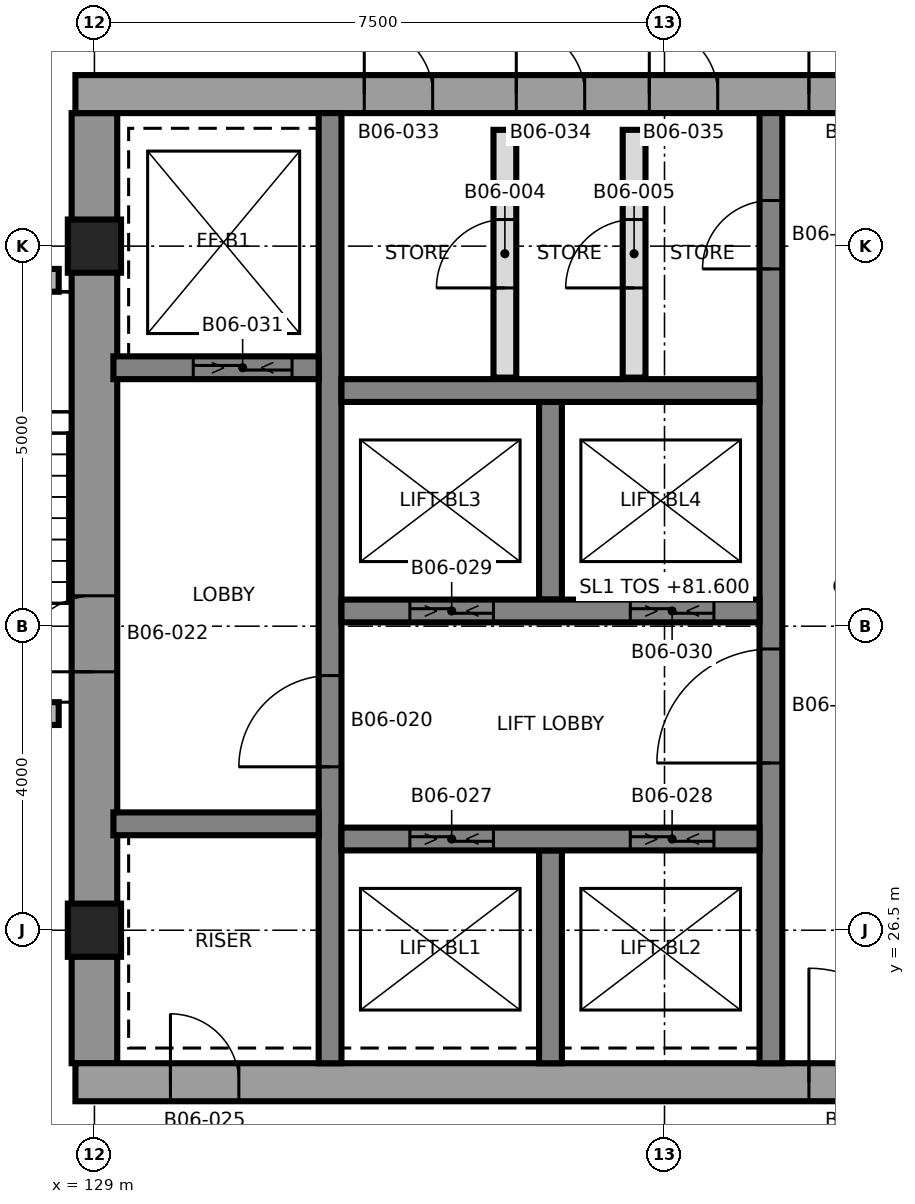
"""IFC4 building model, lengths in metres.
Left out: names, types, materials, properties, quantities, classifications, styles, units other than length and angle.
Written with IfcOpenShell. Run it as: python <this file> out.ifc"""

import sys

from ifc_helpers import new_model, si_unit, direction, frame, frame_2d, origin, origin_2d, place, context, subcontext, project, spatial, rectangle, extrude, element, fill, save


model = new_model("IFC4")
c1 = context("Model", 3, precision=1e-05, world=origin(), true_north=direction((0.0, 1.0)))
c2 = subcontext(c1, "Body", "Model", "MODEL_VIEW")
j1 = project(units=[si_unit("LENGTHUNIT", "METRE"), si_unit("PLANEANGLEUNIT", "RADIAN")], contexts=[c1])
p1 = place(None, origin())
s1 = spatial("IfcSite", under=j1, at=p1, CompositionType="ELEMENT")
p2 = place(p1, origin())
s2 = spatial("IfcBuilding", under=s1, at=p2, CompositionType="ELEMENT")
p3 = place(p2, frame((0.0, 0.0, 81.6)))
s3 = spatial("IfcBuildingStorey", under=s2, at=p3, CompositionType="ELEMENT", Elevation=81.6)
p4 = place(p3, frame((129.0, 24.75, 0.0), z_axis=(0.0, 0.0, 1.0), x_axis=(0.0, 1.0, 0.0)))
e1 = element("IfcWall", 1, at=p4, inside=s3, PredefinedType="SHEAR", context=c2, shape_type="SweptSolid", body=[
    extrude(rectangle(XDim=12.5, YDim=0.6, at=frame_2d((6.25, 0.0))), origin(), (0.0, 0.0, 1.0), 5.5),
])
p5 = place(p4, frame((5.15, 0.0, 0.0)))
e2 = element("IfcOpeningElement", 2, at=p5, cuts=e1, PredefinedType="OPENING", context=c2, shape_type="SweptSolid", body=[
    extrude(rectangle(XDim=1.0, YDim=2.1, at=frame_2d((0.5, 1.05))), frame((0.0, 0.31, 0.0), z_axis=(0.0, -1.0, 0.0), x_axis=(1.0, 0.0, 0.0)), (0.0, 0.0, 1.0), 0.62),
])
p6 = place(p3, frame((128.75, 24.5, 0.0), z_axis=(0.0, 0.0, 1.0), x_axis=(1.0, 0.0, 0.0)))
e3 = element("IfcWall", 3, at=p6, inside=s3, PredefinedType="SHEAR", context=c2, shape_type="SweptSolid", body=[
    extrude(rectangle(XDim=15.0, YDim=0.5, at=frame_2d((7.5, 0.0))), origin(), (0.0, 0.0, 1.0), 5.5),
])
p7 = place(p6, frame((9.65, 0.0, 0.0)))
e4 = element("IfcOpeningElement", 4, at=p7, cuts=e3, PredefinedType="OPENING", context=c2, shape_type="SweptSolid", body=[
    extrude(rectangle(XDim=1.5, YDim=2.1, at=frame_2d((0.75, 1.05))), frame((0.0, 0.26, 0.0), z_axis=(0.0, -1.0, 0.0), x_axis=(1.0, 0.0, 0.0)), (0.0, 0.0, 1.0), 0.52),
])
p8 = place(p6, frame((1.25, 0.0, 0.0)))
e5 = element("IfcOpeningElement", 5, at=p8, cuts=e3, PredefinedType="OPENING", context=c2, shape_type="SweptSolid", body=[
    extrude(rectangle(XDim=0.9, YDim=2.1, at=frame_2d((0.45, 1.05))), frame((0.0, 0.26, 0.0), z_axis=(0.0, -1.0, 0.0), x_axis=(1.0, 0.0, 0.0)), (0.0, 0.0, 1.0), 0.52),
])
p9 = place(p3, frame((128.75, 37.5, 0.0), z_axis=(0.0, 0.0, 1.0), x_axis=(1.0, 0.0, 0.0)))
e6 = element("IfcWall", 6, at=p9, inside=s3, PredefinedType="SHEAR", context=c2, shape_type="SweptSolid", body=[
    extrude(rectangle(XDim=15.0, YDim=0.5, at=frame_2d((7.5, 0.0))), origin(), (0.0, 0.0, 1.0), 5.5),
])
p10 = place(p9, frame((9.65, 0.0, 0.0)))
e7 = element("IfcOpeningElement", 7, at=p10, cuts=e6, PredefinedType="OPENING", context=c2, shape_type="SweptSolid", body=[
    extrude(rectangle(XDim=1.5, YDim=2.1, at=frame_2d((0.75, 1.05))), frame((0.0, 0.26, 0.0), z_axis=(0.0, -1.0, 0.0), x_axis=(1.0, 0.0, 0.0)), (0.0, 0.0, 1.0), 0.52),
])
p11 = place(p9, frame((12.85, 0.0, 0.0)))
e8 = element("IfcOpeningElement", 8, at=p11, cuts=e6, PredefinedType="OPENING", context=c2, shape_type="SweptSolid", body=[
    extrude(rectangle(XDim=0.9, YDim=2.1, at=frame_2d((0.45, 1.05))), frame((0.0, 0.26, 0.0), z_axis=(0.0, -1.0, 0.0), x_axis=(1.0, 0.0, 0.0)), (0.0, 0.0, 1.0), 0.52),
])
p12 = place(p9, frame((3.8, 0.0, 0.0)))
e9 = element("IfcOpeningElement", 9, at=p12, cuts=e6, PredefinedType="OPENING", context=c2, shape_type="SweptSolid", body=[
    extrude(rectangle(XDim=0.9, YDim=2.1, at=frame_2d((0.45, 1.05))), frame((0.0, 0.26, 0.0), z_axis=(0.0, -1.0, 0.0), x_axis=(1.0, 0.0, 0.0)), (0.0, 0.0, 1.0), 0.52),
])
p13 = place(p9, frame((5.8, 0.0, 0.0)))
e10 = element("IfcOpeningElement", 10, at=p13, cuts=e6, PredefinedType="OPENING", context=c2, shape_type="SweptSolid", body=[
    extrude(rectangle(XDim=0.9, YDim=2.1, at=frame_2d((0.45, 1.05))), frame((0.0, 0.26, 0.0), z_axis=(0.0, -1.0, 0.0), x_axis=(1.0, 0.0, 0.0)), (0.0, 0.0, 1.0), 0.52),
])
p14 = place(p9, frame((7.55, 0.0, 0.0)))
e11 = element("IfcOpeningElement", 11, at=p14, cuts=e6, PredefinedType="OPENING", context=c2, shape_type="SweptSolid", body=[
    extrude(rectangle(XDim=0.9, YDim=2.1, at=frame_2d((0.45, 1.05))), frame((0.0, 0.26, 0.0), z_axis=(0.0, -1.0, 0.0), x_axis=(1.0, 0.0, 0.0)), (0.0, 0.0, 1.0), 0.52),
])
p15 = place(p3, frame((132.1, 24.75, 0.0), z_axis=(0.0, 0.0, 1.0), x_axis=(0.0, 1.0, 0.0)))
e12 = element("IfcWall", 12, at=p15, inside=s3, PredefinedType="SHEAR", context=c2, shape_type="SweptSolid", body=[
    extrude(rectangle(XDim=12.5, YDim=0.3, at=frame_2d((6.25, 0.0))), origin(), (0.0, 0.0, 1.0), 5.5),
])
p16 = place(p15, frame((3.9, 0.0, 0.0)))
e13 = element("IfcOpeningElement", 13, at=p16, cuts=e12, PredefinedType="OPENING", context=c2, shape_type="SweptSolid", body=[
    extrude(rectangle(XDim=1.2, YDim=2.1, at=frame_2d((0.6, 1.05))), frame((0.0, 0.16, 0.0), z_axis=(0.0, -1.0, 0.0), x_axis=(1.0, 0.0, 0.0)), (0.0, 0.0, 1.0), 0.32),
])
p17 = place(p3, frame((137.9, 24.75, 0.0), z_axis=(0.0, 0.0, 1.0), x_axis=(0.0, 1.0, 0.0)))
e14 = element("IfcWall", 14, at=p17, inside=s3, PredefinedType="SHEAR", context=c2, shape_type="SweptSolid", body=[
    extrude(rectangle(XDim=12.5, YDim=0.3, at=frame_2d((6.25, 0.0))), origin(), (0.0, 0.0, 1.0), 5.5),
])
p18 = place(p17, frame((3.95, 0.0, 0.0)))
e15 = element("IfcOpeningElement", 15, at=p18, cuts=e14, PredefinedType="OPENING", context=c2, shape_type="SweptSolid", body=[
    extrude(rectangle(XDim=1.5, YDim=2.1, at=frame_2d((0.75, 1.05))), frame((0.0, 0.16, 0.0), z_axis=(0.0, -1.0, 0.0), x_axis=(1.0, 0.0, 0.0)), (0.0, 0.0, 1.0), 0.32),
])
p19 = place(p17, frame((10.45, 0.0, 0.0)))
e16 = element("IfcOpeningElement", 16, at=p19, cuts=e14, PredefinedType="OPENING", context=c2, shape_type="SweptSolid", body=[
    extrude(rectangle(XDim=0.9, YDim=2.1, at=frame_2d((0.45, 1.05))), frame((0.0, 0.16, 0.0), z_axis=(0.0, -1.0, 0.0), x_axis=(1.0, 0.0, 0.0)), (0.0, 0.0, 1.0), 0.32),
])
p20 = place(p3, frame((135.0, 24.75, 0.0), z_axis=(0.0, 0.0, 1.0), x_axis=(0.0, 1.0, 0.0)))
e17 = element("IfcWall", 17, at=p20, inside=s3, PredefinedType="SHEAR", context=c2, shape_type="SweptSolid", body=[
    extrude(rectangle(XDim=2.8, YDim=0.3, at=frame_2d((1.4, 0.0))), origin(), (0.0, 0.0, 1.0), 5.5),
])
p21 = place(p3, frame((135.0, 30.85, 0.0), z_axis=(0.0, 0.0, 1.0), x_axis=(0.0, 1.0, 0.0)))
e18 = element("IfcWall", 18, at=p21, inside=s3, PredefinedType="SHEAR", context=c2, shape_type="SweptSolid", body=[
    extrude(rectangle(XDim=2.6, YDim=0.3, at=frame_2d((1.3, 0.0))), origin(), (0.0, 0.0, 1.0), 5.5),
])
p22 = place(p3, frame((132.25, 27.7, 0.0), z_axis=(0.0, 0.0, 1.0), x_axis=(1.0, 0.0, 0.0)))
e19 = element("IfcWall", 19, at=p22, inside=s3, PredefinedType="SHEAR", context=c2, shape_type="SweptSolid", body=[
    extrude(rectangle(XDim=5.5, YDim=0.3, at=frame_2d((2.75, 0.0))), origin(), (0.0, 0.0, 1.0), 5.5),
])
p23 = place(p22, frame((0.9, 0.0, 0.0)))
e20 = element("IfcOpeningElement", 20, at=p23, cuts=e19, PredefinedType="OPENING", context=c2, shape_type="SweptSolid", body=[
    extrude(rectangle(XDim=1.1, YDim=2.4, at=frame_2d((0.55, 1.2))), frame((0.0, 0.16, 0.0), z_axis=(0.0, -1.0, 0.0), x_axis=(1.0, 0.0, 0.0)), (0.0, 0.0, 1.0), 0.32),
])
p24 = place(p22, frame((3.8, 0.0, 0.0)))
e21 = element("IfcOpeningElement", 21, at=p24, cuts=e19, PredefinedType="OPENING", context=c2, shape_type="SweptSolid", body=[
    extrude(rectangle(XDim=1.1, YDim=2.4, at=frame_2d((0.55, 1.2))), frame((0.0, 0.16, 0.0), z_axis=(0.0, -1.0, 0.0), x_axis=(1.0, 0.0, 0.0)), (0.0, 0.0, 1.0), 0.32),
])
p25 = place(p3, frame((132.25, 30.7, 0.0), z_axis=(0.0, 0.0, 1.0), x_axis=(1.0, 0.0, 0.0)))
e22 = element("IfcWall", 22, at=p25, inside=s3, PredefinedType="SHEAR", context=c2, shape_type="SweptSolid", body=[
    extrude(rectangle(XDim=5.5, YDim=0.3, at=frame_2d((2.75, 0.0))), origin(), (0.0, 0.0, 1.0), 5.5),
])
p26 = place(p25, frame((0.9, 0.0, 0.0)))
e23 = element("IfcOpeningElement", 23, at=p26, cuts=e22, PredefinedType="OPENING", context=c2, shape_type="SweptSolid", body=[
    extrude(rectangle(XDim=1.1, YDim=2.4, at=frame_2d((0.55, 1.2))), frame((0.0, 0.16, 0.0), z_axis=(0.0, -1.0, 0.0), x_axis=(1.0, 0.0, 0.0)), (0.0, 0.0, 1.0), 0.32),
])
p27 = place(p25, frame((3.8, 0.0, 0.0)))
e24 = element("IfcOpeningElement", 24, at=p27, cuts=e22, PredefinedType="OPENING", context=c2, shape_type="SweptSolid", body=[
    extrude(rectangle(XDim=1.1, YDim=2.4, at=frame_2d((0.55, 1.2))), frame((0.0, 0.16, 0.0), z_axis=(0.0, -1.0, 0.0), x_axis=(1.0, 0.0, 0.0)), (0.0, 0.0, 1.0), 0.32),
])
p28 = place(p3, frame((132.25, 33.6, 0.0), z_axis=(0.0, 0.0, 1.0), x_axis=(1.0, 0.0, 0.0)))
e25 = element("IfcWall", 25, at=p28, inside=s3, PredefinedType="SHEAR", context=c2, shape_type="SweptSolid", body=[
    extrude(rectangle(XDim=5.5, YDim=0.3, at=frame_2d((2.75, 0.0))), origin(), (0.0, 0.0, 1.0), 5.5),
])
p29 = place(p3, frame((129.25, 27.9, 0.0), z_axis=(0.0, 0.0, 1.0), x_axis=(1.0, 0.0, 0.0)))
e26 = element("IfcWall", 26, at=p29, inside=s3, PredefinedType="SHEAR", context=c2, shape_type="SweptSolid", body=[
    extrude(rectangle(XDim=2.7, YDim=0.3, at=frame_2d((1.35, 0.0))), origin(), (0.0, 0.0, 1.0), 5.5),
])
p30 = place(p3, frame((129.25, 33.9, 0.0), z_axis=(0.0, 0.0, 1.0), x_axis=(1.0, 0.0, 0.0)))
e27 = element("IfcWall", 27, at=p30, inside=s3, PredefinedType="SHEAR", context=c2, shape_type="SweptSolid", body=[
    extrude(rectangle(XDim=2.7, YDim=0.3, at=frame_2d((1.35, 0.0))), origin(), (0.0, 0.0, 1.0), 5.5),
])
p31 = place(p30, frame((1.05, 0.0, 0.0)))
e28 = element("IfcOpeningElement", 28, at=p31, cuts=e27, PredefinedType="OPENING", context=c2, shape_type="SweptSolid", body=[
    extrude(rectangle(XDim=1.3, YDim=2.4, at=frame_2d((0.65, 1.2))), frame((0.0, 0.16, 0.0), z_axis=(0.0, -1.0, 0.0), x_axis=(1.0, 0.0, 0.0)), (0.0, 0.0, 1.0), 0.32),
])
for number, where, z_axis, x_axis in (
    (29, (129.0, 26.5, 0.0), (0.0, 0.0, 1.0), (1.0, 0.0, 0.0)),
    (30, (129.0, 35.5, 0.0), (0.0, 0.0, 1.0), (1.0, 0.0, 0.0)),
):
    element("IfcColumn", number, at=place(p3, frame(where, z_axis=z_axis, x_axis=x_axis)), inside=s3, PredefinedType="COLUMN", context=c2, shape_type="SweptSolid", body=[
        extrude(rectangle(XDim=0.7, YDim=0.7, at=origin_2d()), origin(), (0.0, 0.0, 1.0), 5.5),
    ])
p32 = place(p3, frame((125.7, 29.35, 0.0), z_axis=(0.0, 0.0, 1.0), x_axis=(1.0, 0.0, 0.0)))
e31 = element("IfcWall", 31, at=p32, inside=s3, PredefinedType="SHEAR", context=c2, shape_type="SweptSolid", body=[
    extrude(rectangle(XDim=2.83, YDim=0.3, at=frame_2d((1.415, 0.0))), origin(), (0.0, 0.0, 1.0), 5.2),
])
p33 = place(p32, frame((0.975, 0.0, 0.0)))
e32 = element("IfcOpeningElement", 32, at=p33, cuts=e31, PredefinedType="OPENING", context=c2, shape_type="SweptSolid", body=[
    extrude(rectangle(XDim=1.2, YDim=2.1, at=frame_2d((0.6, 1.05))), frame((0.0, 0.16, 0.0), z_axis=(0.0, -1.0, 0.0), x_axis=(1.0, 0.0, 0.0)), (0.0, 0.0, 1.0), 0.32),
])
p34 = place(p3, frame((125.7, 35.05, 0.0), z_axis=(0.0, 0.0, 1.0), x_axis=(1.0, 0.0, 0.0)))
e33 = element("IfcWall", 33, at=p34, inside=s3, PredefinedType="SHEAR", context=c2, shape_type="SweptSolid", body=[
    extrude(rectangle(XDim=2.83, YDim=0.3, at=frame_2d((1.415, 0.0))), origin(), (0.0, 0.0, 1.0), 5.2),
])
p35 = place(p3, frame((134.4, 33.77, 0.0), z_axis=(0.0, 0.0, 1.0), x_axis=(0.0, 1.0, 0.0)))
e34 = element("IfcWall", 34, at=p35, inside=s3, PredefinedType="PARTITIONING", context=c2, shape_type="SweptSolid", body=[
    extrude(rectangle(XDim=3.26, YDim=0.3, at=frame_2d((1.63, 0.0))), origin(), (0.0, 0.0, 1.0), 5.2),
])
p36 = place(p35, frame((1.18, 0.0, 0.0)))
e35 = element("IfcOpeningElement", 35, at=p36, cuts=e34, PredefinedType="OPENING", context=c2, shape_type="SweptSolid", body=[
    extrude(rectangle(XDim=0.9, YDim=2.1, at=frame_2d((0.45, 1.05))), frame((0.0, 0.16, 0.0), z_axis=(0.0, -1.0, 0.0), x_axis=(1.0, 0.0, 0.0)), (0.0, 0.0, 1.0), 0.32),
])
p37 = place(p3, frame((136.1, 33.77, 0.0), z_axis=(0.0, 0.0, 1.0), x_axis=(0.0, 1.0, 0.0)))
e36 = element("IfcWall", 36, at=p37, inside=s3, PredefinedType="PARTITIONING", context=c2, shape_type="SweptSolid", body=[
    extrude(rectangle(XDim=3.26, YDim=0.3, at=frame_2d((1.63, 0.0))), origin(), (0.0, 0.0, 1.0), 5.2),
])
p38 = place(p37, frame((1.18, 0.0, 0.0)))
e37 = element("IfcOpeningElement", 37, at=p38, cuts=e36, PredefinedType="OPENING", context=c2, shape_type="SweptSolid", body=[
    extrude(rectangle(XDim=0.9, YDim=2.1, at=frame_2d((0.45, 1.05))), frame((0.0, 0.16, 0.0), z_axis=(0.0, -1.0, 0.0), x_axis=(1.0, 0.0, 0.0)), (0.0, 0.0, 1.0), 0.32),
])
p39 = place(p36, origin())
e38 = element("IfcDoor", 38, at=p39, inside=s3, OperationType="SINGLE_SWING_RIGHT", PredefinedType="DOOR", context=c2, shape_type="SweptSolid", body=[
    extrude(rectangle(XDim=0.9, YDim=2.1, at=frame_2d((0.45, 1.05))), frame((0.0, 0.025, 0.0), z_axis=(0.0, -1.0, 0.0), x_axis=(1.0, 0.0, 0.0)), (0.0, 0.0, 1.0), 0.05),
])
fill(e35, e38)
p40 = place(p38, origin())
e39 = element("IfcDoor", 39, at=p40, inside=s3, OperationType="SINGLE_SWING_LEFT", PredefinedType="DOOR", context=c2, shape_type="SweptSolid", body=[
    extrude(rectangle(XDim=0.9, YDim=2.1, at=frame_2d((0.45, 1.05))), frame((0.0, 0.025, 0.0), z_axis=(0.0, -1.0, 0.0), x_axis=(1.0, 0.0, 0.0)), (0.0, 0.0, 1.0), 0.05),
])
fill(e37, e39)
p41 = place(p18, origin())
e40 = element("IfcDoor", 40, at=p41, inside=s3, OperationType="SINGLE_SWING_RIGHT", PredefinedType="DOOR", context=c2, shape_type="SweptSolid", body=[
    extrude(rectangle(XDim=1.5, YDim=2.1, at=frame_2d((0.75, 1.05))), frame((0.0, 0.025, 0.0), z_axis=(0.0, -1.0, 0.0), x_axis=(1.0, 0.0, 0.0)), (0.0, 0.0, 1.0), 0.05),
])
fill(e15, e40)
p42 = place(p16, origin())
e41 = element("IfcDoor", 41, at=p42, inside=s3, OperationType="SINGLE_SWING_LEFT", PredefinedType="DOOR", context=c2, shape_type="SweptSolid", body=[
    extrude(rectangle(XDim=1.2, YDim=2.1, at=frame_2d((0.6, 1.05))), frame((0.0, 0.025, 0.0), z_axis=(0.0, -1.0, 0.0), x_axis=(1.0, 0.0, 0.0)), (0.0, 0.0, 1.0), 0.05),
])
fill(e13, e41)
p43 = place(p5, origin())
e42 = element("IfcDoor", 42, at=p43, inside=s3, OperationType="SINGLE_SWING_RIGHT", PredefinedType="DOOR", context=c2, shape_type="SweptSolid", body=[
    extrude(rectangle(XDim=1.0, YDim=2.1, at=frame_2d((0.5, 1.05))), frame((0.0, 0.025, 0.0), z_axis=(0.0, -1.0, 0.0), x_axis=(1.0, 0.0, 0.0)), (0.0, 0.0, 1.0), 0.05),
])
fill(e2, e42)
p44 = place(p7, origin())
e43 = element("IfcDoor", 43, at=p44, inside=s3, OperationType="SINGLE_SWING_LEFT", PredefinedType="DOOR", context=c2, shape_type="SweptSolid", body=[
    extrude(rectangle(XDim=1.5, YDim=2.1, at=frame_2d((0.75, 1.05))), frame((0.0, 0.025, 0.0), z_axis=(0.0, -1.0, 0.0), x_axis=(1.0, 0.0, 0.0)), (0.0, 0.0, 1.0), 0.05),
])
fill(e4, e43)
p45 = place(p10, origin())
e44 = element("IfcDoor", 44, at=p45, inside=s3, OperationType="SINGLE_SWING_RIGHT", PredefinedType="DOOR", context=c2, shape_type="SweptSolid", body=[
    extrude(rectangle(XDim=1.5, YDim=2.1, at=frame_2d((0.75, 1.05))), frame((0.0, 0.025, 0.0), z_axis=(0.0, -1.0, 0.0), x_axis=(1.0, 0.0, 0.0)), (0.0, 0.0, 1.0), 0.05),
])
fill(e7, e44)
p46 = place(p8, origin())
e45 = element("IfcDoor", 45, at=p46, inside=s3, OperationType="SINGLE_SWING_LEFT", PredefinedType="DOOR", context=c2, shape_type="SweptSolid", body=[
    extrude(rectangle(XDim=0.9, YDim=2.1, at=frame_2d((0.45, 1.05))), frame((0.0, 0.025, 0.0), z_axis=(0.0, -1.0, 0.0), x_axis=(1.0, 0.0, 0.0)), (0.0, 0.0, 1.0), 0.05),
])
fill(e5, e45)
p47 = place(p23, origin())
e46 = element("IfcDoor", 46, at=p47, inside=s3, OperationType="SLIDING_TO_LEFT", PredefinedType="DOOR", context=c2, shape_type="SweptSolid", body=[
    extrude(rectangle(XDim=1.1, YDim=2.4, at=frame_2d((0.55, 1.2))), frame((0.0, 0.025, 0.0), z_axis=(0.0, -1.0, 0.0), x_axis=(1.0, 0.0, 0.0)), (0.0, 0.0, 1.0), 0.05),
])
fill(e20, e46)
p48 = place(p24, origin())
e47 = element("IfcDoor", 47, at=p48, inside=s3, OperationType="SLIDING_TO_LEFT", PredefinedType="DOOR", context=c2, shape_type="SweptSolid", body=[
    extrude(rectangle(XDim=1.1, YDim=2.4, at=frame_2d((0.55, 1.2))), frame((0.0, 0.025, 0.0), z_axis=(0.0, -1.0, 0.0), x_axis=(1.0, 0.0, 0.0)), (0.0, 0.0, 1.0), 0.05),
])
fill(e21, e47)
p49 = place(p26, origin())
e48 = element("IfcDoor", 48, at=p49, inside=s3, OperationType="SLIDING_TO_LEFT", PredefinedType="DOOR", context=c2, shape_type="SweptSolid", body=[
    extrude(rectangle(XDim=1.1, YDim=2.4, at=frame_2d((0.55, 1.2))), frame((0.0, 0.025, 0.0), z_axis=(0.0, -1.0, 0.0), x_axis=(1.0, 0.0, 0.0)), (0.0, 0.0, 1.0), 0.05),
])
fill(e23, e48)
p50 = place(p27, origin())
e49 = element("IfcDoor", 49, at=p50, inside=s3, OperationType="SLIDING_TO_LEFT", PredefinedType="DOOR", context=c2, shape_type="SweptSolid", body=[
    extrude(rectangle(XDim=1.1, YDim=2.4, at=frame_2d((0.55, 1.2))), frame((0.0, 0.025, 0.0), z_axis=(0.0, -1.0, 0.0), x_axis=(1.0, 0.0, 0.0)), (0.0, 0.0, 1.0), 0.05),
])
fill(e24, e49)
p51 = place(p31, origin())
e50 = element("IfcDoor", 50, at=p51, inside=s3, OperationType="SLIDING_TO_LEFT", PredefinedType="DOOR", context=c2, shape_type="SweptSolid", body=[
    extrude(rectangle(XDim=1.3, YDim=2.4, at=frame_2d((0.65, 1.2))), frame((0.0, 0.025, 0.0), z_axis=(0.0, -1.0, 0.0), x_axis=(1.0, 0.0, 0.0)), (0.0, 0.0, 1.0), 0.05),
])
fill(e28, e50)
p52 = place(p12, origin())
e51 = element("IfcDoor", 51, at=p52, inside=s3, OperationType="SINGLE_SWING_LEFT", PredefinedType="DOOR", context=c2, shape_type="SweptSolid", body=[
    extrude(rectangle(XDim=0.9, YDim=2.1, at=frame_2d((0.45, 1.05))), frame((0.0, 0.025, 0.0), z_axis=(0.0, -1.0, 0.0), x_axis=(1.0, 0.0, 0.0)), (0.0, 0.0, 1.0), 0.05),
])
fill(e9, e51)
p53 = place(p13, origin())
e52 = element("IfcDoor", 52, at=p53, inside=s3, OperationType="SINGLE_SWING_RIGHT", PredefinedType="DOOR", context=c2, shape_type="SweptSolid", body=[
    extrude(rectangle(XDim=0.9, YDim=2.1, at=frame_2d((0.45, 1.05))), frame((0.0, 0.025, 0.0), z_axis=(0.0, -1.0, 0.0), x_axis=(1.0, 0.0, 0.0)), (0.0, 0.0, 1.0), 0.05),
])
fill(e10, e52)
p54 = place(p14, origin())
e53 = element("IfcDoor", 53, at=p54, inside=s3, OperationType="SINGLE_SWING_LEFT", PredefinedType="DOOR", context=c2, shape_type="SweptSolid", body=[
    extrude(rectangle(XDim=0.9, YDim=2.1, at=frame_2d((0.45, 1.05))), frame((0.0, 0.025, 0.0), z_axis=(0.0, -1.0, 0.0), x_axis=(1.0, 0.0, 0.0)), (0.0, 0.0, 1.0), 0.05),
])
fill(e11, e53)
p55 = place(p19, origin())
e54 = element("IfcDoor", 54, at=p55, inside=s3, OperationType="SINGLE_SWING_RIGHT", PredefinedType="DOOR", context=c2, shape_type="SweptSolid", body=[
    extrude(rectangle(XDim=0.9, YDim=2.1, at=frame_2d((0.45, 1.05))), frame((0.0, 0.025, 0.0), z_axis=(0.0, -1.0, 0.0), x_axis=(1.0, 0.0, 0.0)), (0.0, 0.0, 1.0), 0.05),
])
fill(e16, e54)
save(model, sys.argv[1])
